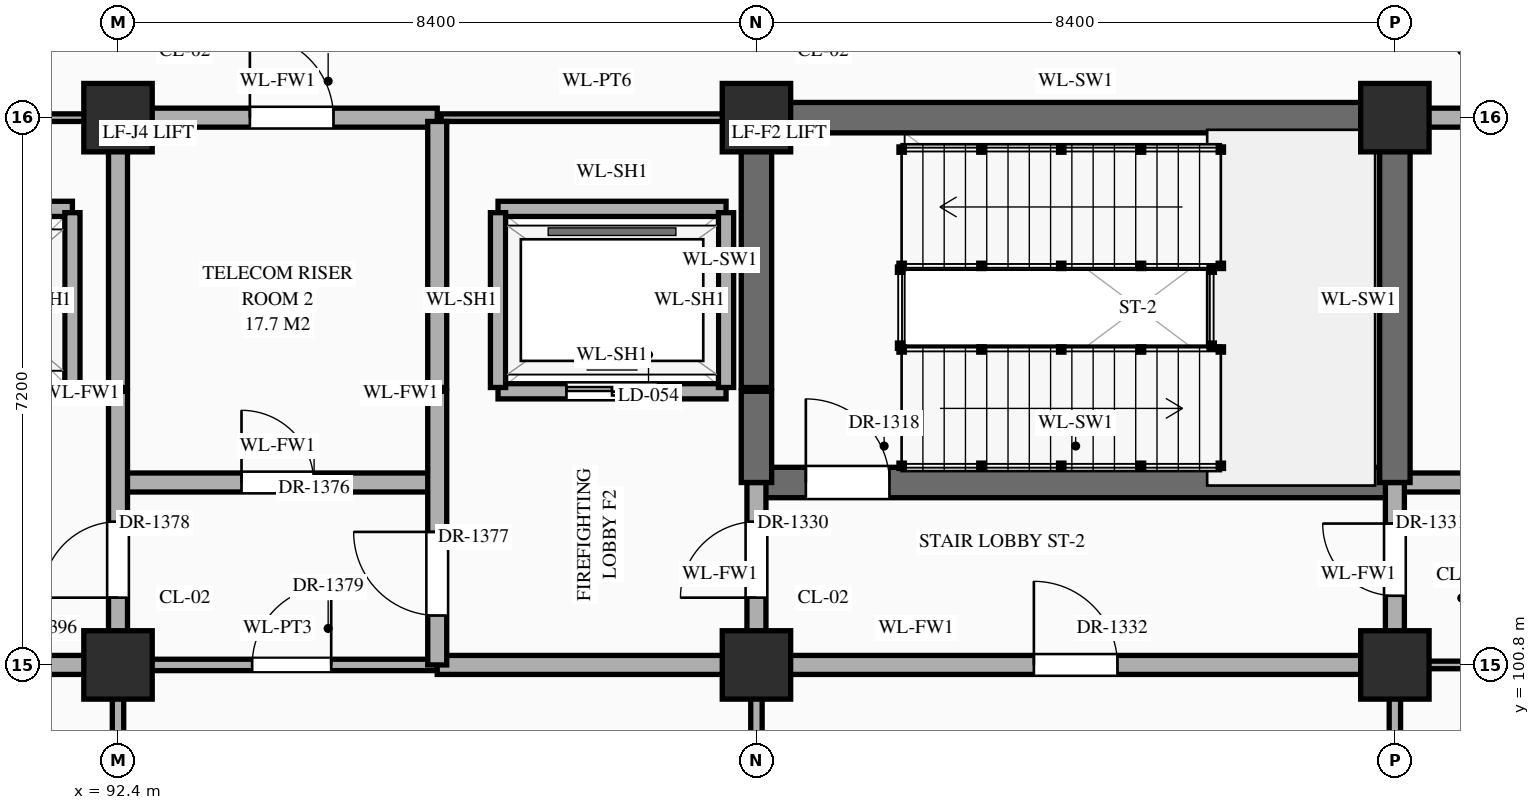
"""IFC4 building model, lengths in metres.
Left out: names, types, materials, properties, quantities, classifications, styles, units other than length and angle.
Written with IfcOpenShell. Run it as: python <this file> out.ifc"""

import sys

from ifc_helpers import new_model, si_unit, direction, frame, frame_2d, origin, origin_2d, place, context, subcontext, project, spatial, rectangle, extrude, element, fill, save


model = new_model("IFC4")
c1 = context("Model", 3, precision=1e-05, world=origin(), true_north=direction((0.0, 1.0)))
c2 = subcontext(c1, "Body", "Model", "MODEL_VIEW")
j1 = project(units=[si_unit("LENGTHUNIT", "METRE"), si_unit("PLANEANGLEUNIT", "RADIAN")], contexts=[c1])
p1 = place(None, origin())
s1 = spatial("IfcSite", under=j1, at=p1, CompositionType="ELEMENT")
p2 = place(p1, origin())
s2 = spatial("IfcBuilding", under=s1, at=p2, CompositionType="ELEMENT")
p3 = place(p2, frame((0.0, 0.0, 10.8)))
s3 = spatial("IfcBuildingStorey", under=s2, at=p3, CompositionType="ELEMENT", Elevation=10.8)
for number, where, z_axis, x_axis in (
    (1, (92.4, 100.8, 0.0), (0.0, 0.0, 1.0), (1.0, 0.0, 0.0)),
    (2, (92.4, 108.0, 0.0), (0.0, 0.0, 1.0), (1.0, 0.0, 0.0)),
    (3, (100.8, 100.8, 0.0), (0.0, 0.0, 1.0), (1.0, 0.0, 0.0)),
    (4, (100.8, 108.0, 0.0), (0.0, 0.0, 1.0), (1.0, 0.0, 0.0)),
    (5, (109.2, 100.8, 0.0), (0.0, 0.0, 1.0), (1.0, 0.0, 0.0)),
    (6, (109.2, 108.0, 0.0), (0.0, 0.0, 1.0), (1.0, 0.0, 0.0)),
):
    element("IfcColumn", number, at=place(p3, frame(where, z_axis=z_axis, x_axis=x_axis)), inside=s3, PredefinedType="COLUMN", context=c2, shape_type="SweptSolid", body=[
        extrude(rectangle(XDim=0.9, YDim=0.9, at=origin_2d()), origin(), (0.0, 0.0, 1.0), 5.4),
    ])
p4 = place(p3, frame((75.6, 100.8, 0.0), z_axis=(0.0, 0.0, 1.0), x_axis=(1.0, 0.0, 0.0)))
e7 = element("IfcWall", 7, at=p4, inside=s3, PredefinedType="STANDARD", context=c2, shape_type="SweptSolid", body=[
    extrude(rectangle(XDim=16.8, YDim=0.25, at=frame_2d((8.4, 0.0))), origin(), (0.0, 0.0, 1.0), 4.27),
])
p5 = place(p4, frame((3.65, 0.0, 0.0)))
e8 = element("IfcOpeningElement", 8, at=p5, cuts=e7, PredefinedType="OPENING", context=c2, shape_type="SweptSolid", body=[
    extrude(rectangle(XDim=1.1, YDim=2.2, at=frame_2d((0.55, 1.1))), frame((0.0, 0.137, 0.0), z_axis=(0.0, -1.0, 0.0), x_axis=(1.0, 0.0, 0.0)), (0.0, 0.0, 1.0), 0.274),
])
p6 = place(p4, frame((9.81, 0.0, 0.0)))
e9 = element("IfcOpeningElement", 9, at=p6, cuts=e7, PredefinedType="OPENING", context=c2, shape_type="SweptSolid", body=[
    extrude(rectangle(XDim=0.95, YDim=2.15, at=frame_2d((0.475, 1.075))), frame((0.0, 0.137, 0.0), z_axis=(0.0, -1.0, 0.0), x_axis=(1.0, 0.0, 0.0)), (0.0, 0.0, 1.0), 0.274),
])
p7 = place(p4, frame((12.45, 0.0, 0.0)))
e10 = element("IfcOpeningElement", 10, at=p7, cuts=e7, PredefinedType="OPENING", context=c2, shape_type="SweptSolid", body=[
    extrude(rectangle(XDim=1.1, YDim=2.2, at=frame_2d((0.55, 1.1))), frame((0.0, 0.137, 0.0), z_axis=(0.0, -1.0, 0.0), x_axis=(1.0, 0.0, 0.0)), (0.0, 0.0, 1.0), 0.274),
])
p8 = place(p4, frame((14.815, 0.0, 0.0)))
e11 = element("IfcOpeningElement", 11, at=p8, cuts=e7, PredefinedType="OPENING", context=c2, shape_type="SweptSolid", body=[
    extrude(rectangle(XDim=1.0, YDim=2.2, at=frame_2d((0.5, 1.1))), frame((0.0, 0.137, 0.0), z_axis=(0.0, -1.0, 0.0), x_axis=(1.0, 0.0, 0.0)), (0.0, 0.0, 1.0), 0.274),
])
p9 = place(p3, frame((92.4, 100.8, 0.0), z_axis=(0.0, 0.0, 1.0), x_axis=(1.0, 0.0, 0.0)))
e12 = element("IfcWall", 12, at=p9, inside=s3, PredefinedType="STANDARD", context=c2, shape_type="SweptSolid", body=[
    extrude(rectangle(XDim=4.2, YDim=0.15, at=frame_2d((2.1, 0.0))), origin(), (0.0, 0.0, 1.0), 4.27),
])
p10 = place(p9, frame((1.765, 0.0, 0.0)))
e13 = element("IfcOpeningElement", 13, at=p10, cuts=e12, PredefinedType="OPENING", context=c2, shape_type="SweptSolid", body=[
    extrude(rectangle(XDim=1.04, YDim=2.2, at=frame_2d((0.52, 1.1))), frame((0.0, 0.087, 0.0), z_axis=(0.0, -1.0, 0.0), x_axis=(1.0, 0.0, 0.0)), (0.0, 0.0, 1.0), 0.174),
])
p11 = place(p3, frame((96.6, 100.8, 0.0), z_axis=(0.0, 0.0, 1.0), x_axis=(1.0, 0.0, 0.0)))
e14 = element("IfcWall", 14, at=p11, inside=s3, PredefinedType="STANDARD", context=c2, shape_type="SweptSolid", body=[
    extrude(rectangle(XDim=12.6, YDim=0.25, at=frame_2d((6.3, 0.0))), origin(), (0.0, 0.0, 1.0), 4.27),
])
p12 = place(p11, frame((7.85, 0.0, 0.0)))
e15 = element("IfcOpeningElement", 15, at=p12, cuts=e14, PredefinedType="OPENING", context=c2, shape_type="SweptSolid", body=[
    extrude(rectangle(XDim=1.1, YDim=2.2, at=frame_2d((0.55, 1.1))), frame((0.0, 0.137, 0.0), z_axis=(0.0, -1.0, 0.0), x_axis=(1.0, 0.0, 0.0)), (0.0, 0.0, 1.0), 0.274),
])
p13 = place(p3, frame((109.2, 100.8, 0.0), z_axis=(0.0, 0.0, 1.0), x_axis=(1.0, 0.0, 0.0)))
e16 = element("IfcWall", 16, at=p13, inside=s3, PredefinedType="STANDARD", context=c2, shape_type="SweptSolid", body=[
    extrude(rectangle(XDim=3.4, YDim=0.1, at=frame_2d((1.7, 0.0))), origin(), (0.0, 0.0, 1.0), 4.27),
])
p14 = place(p13, frame((1.425, 0.0, 0.0)))
e17 = element("IfcOpeningElement", 17, at=p14, cuts=e16, PredefinedType="OPENING", context=c2, shape_type="SweptSolid", body=[
    extrude(rectangle(XDim=0.92, YDim=2.15, at=frame_2d((0.46, 1.075))), frame((0.0, 0.062, 0.0), z_axis=(0.0, -1.0, 0.0), x_axis=(1.0, 0.0, 0.0)), (0.0, 0.0, 1.0), 0.124),
])
p15 = place(p3, frame((92.4, 103.2, 0.0), z_axis=(0.0, 0.0, 1.0), x_axis=(1.0, 0.0, 0.0)))
e18 = element("IfcWall", 18, at=p15, inside=s3, PredefinedType="STANDARD", context=c2, shape_type="SweptSolid", body=[
    extrude(rectangle(XDim=4.2, YDim=0.25, at=frame_2d((2.1, 0.0))), origin(), (0.0, 0.0, 1.0), 5.12),
])
p16 = place(p15, frame((1.625, 0.0, 0.0)))
e19 = element("IfcOpeningElement", 19, at=p16, cuts=e18, PredefinedType="OPENING", context=c2, shape_type="SweptSolid", body=[
    extrude(rectangle(XDim=0.95, YDim=2.15, at=frame_2d((0.475, 1.075))), frame((0.0, 0.137, 0.0), z_axis=(0.0, -1.0, 0.0), x_axis=(1.0, 0.0, 0.0)), (0.0, 0.0, 1.0), 0.274),
])
p17 = place(p3, frame((100.8, 103.2, 0.0), z_axis=(0.0, 0.0, 1.0), x_axis=(1.0, 0.0, 0.0)))
e20 = element("IfcWall", 20, at=p17, inside=s3, PredefinedType="SHEAR", context=c2, shape_type="SweptSolid", body=[
    extrude(rectangle(XDim=8.4, YDim=0.4, at=frame_2d((4.2, 0.0))), origin(), (0.0, 0.0, 1.0), 5.12),
])
p18 = place(p17, frame((0.65, 0.0, 0.0)))
e21 = element("IfcOpeningElement", 21, at=p18, cuts=e20, PredefinedType="OPENING", context=c2, shape_type="SweptSolid", body=[
    extrude(rectangle(XDim=1.1, YDim=2.2, at=frame_2d((0.55, 1.1))), frame((0.0, 0.212, 0.0), z_axis=(0.0, -1.0, 0.0), x_axis=(1.0, 0.0, 0.0)), (0.0, 0.0, 1.0), 0.424),
])
p19 = place(p3, frame((109.2, 103.2, 0.0), z_axis=(0.0, 0.0, 1.0), x_axis=(1.0, 0.0, 0.0)))
e22 = element("IfcWall", 22, at=p19, inside=s3, PredefinedType="STANDARD", context=c2, shape_type="SweptSolid", body=[
    extrude(rectangle(XDim=4.2, YDim=0.25, at=frame_2d((2.1, 0.0))), origin(), (0.0, 0.0, 1.0), 5.12),
])
p20 = place(p19, frame((1.6, 0.0, 0.0)))
e23 = element("IfcOpeningElement", 23, at=p20, cuts=e22, PredefinedType="OPENING", context=c2, shape_type="SweptSolid", body=[
    extrude(rectangle(XDim=1.0, YDim=2.2, at=frame_2d((0.5, 1.1))), frame((0.0, 0.137, 0.0), z_axis=(0.0, -1.0, 0.0), x_axis=(1.0, 0.0, 0.0)), (0.0, 0.0, 1.0), 0.274),
])
p21 = place(p3, frame((89.4, 104.4, 0.0), z_axis=(0.0, 0.0, 1.0), x_axis=(1.0, 0.0, 0.0)))
e24 = element("IfcWall", 24, at=p21, inside=s3, PredefinedType="STANDARD", context=c2, shape_type="SweptSolid", body=[
    extrude(rectangle(XDim=2.4, YDim=0.2, at=frame_2d((1.2, 0.0))), origin(), (0.0, 0.0, 1.0), 5.12),
])
p22 = place(p21, frame((0.7, 0.0, 0.0)))
e25 = element("IfcOpeningElement", 25, at=p22, cuts=e24, PredefinedType="OPENING", context=c2, shape_type="SweptSolid", body=[
    extrude(rectangle(XDim=1.0, YDim=2.15, at=frame_2d((0.5, 1.075))), frame((0.0, 0.112, 0.0), z_axis=(0.0, -1.0, 0.0), x_axis=(1.0, 0.0, 0.0)), (0.0, 0.0, 1.0), 0.224),
])
p23 = place(p3, frame((97.4, 104.4, 0.0), z_axis=(0.0, 0.0, 1.0), x_axis=(1.0, 0.0, 0.0)))
e26 = element("IfcWall", 26, at=p23, inside=s3, PredefinedType="STANDARD", context=c2, shape_type="SweptSolid", body=[
    extrude(rectangle(XDim=3.0, YDim=0.2, at=frame_2d((1.5, 0.0))), origin(), (0.0, 0.0, 1.0), 5.12),
])
p24 = place(p23, frame((0.9, 0.0, 0.0)))
e27 = element("IfcOpeningElement", 27, at=p24, cuts=e26, PredefinedType="OPENING", context=c2, shape_type="SweptSolid", body=[
    extrude(rectangle(XDim=1.2, YDim=2.15, at=frame_2d((0.6, 1.075))), frame((0.0, 0.112, 0.0), z_axis=(0.0, -1.0, 0.0), x_axis=(1.0, 0.0, 0.0)), (0.0, 0.0, 1.0), 0.224),
])
p25 = place(p3, frame((89.4, 106.8, 0.0), z_axis=(0.0, 0.0, 1.0), x_axis=(1.0, 0.0, 0.0)))
e28 = element("IfcWall", 28, at=p25, inside=s3, PredefinedType="STANDARD", context=c2, shape_type="SweptSolid", body=[
    extrude(rectangle(XDim=2.4, YDim=0.2, at=frame_2d((1.2, 0.0))), origin(), (0.0, 0.0, 1.0), 5.12),
])
p26 = place(p3, frame((97.4, 106.8, 0.0), z_axis=(0.0, 0.0, 1.0), x_axis=(1.0, 0.0, 0.0)))
e29 = element("IfcWall", 29, at=p26, inside=s3, PredefinedType="STANDARD", context=c2, shape_type="SweptSolid", body=[
    extrude(rectangle(XDim=3.0, YDim=0.2, at=frame_2d((1.5, 0.0))), origin(), (0.0, 0.0, 1.0), 5.12),
])
p27 = place(p3, frame((86.2, 108.0, 0.0), z_axis=(0.0, 0.0, 1.0), x_axis=(1.0, 0.0, 0.0)))
e30 = element("IfcWall", 30, at=p27, inside=s3, PredefinedType="STANDARD", context=c2, shape_type="SweptSolid", body=[
    extrude(rectangle(XDim=6.15, YDim=0.1, at=frame_2d((3.075, 0.0))), origin(), (0.0, 0.0, 1.0), 4.27),
])
p28 = place(p3, frame((92.4, 108.0, 0.0), z_axis=(0.0, 0.0, 1.0), x_axis=(1.0, 0.0, 0.0)))
e31 = element("IfcWall", 31, at=p28, inside=s3, PredefinedType="STANDARD", context=c2, shape_type="SweptSolid", body=[
    extrude(rectangle(XDim=4.2, YDim=0.25, at=frame_2d((2.1, 0.0))), origin(), (0.0, 0.0, 1.0), 4.27),
])
p29 = place(p28, frame((1.735, 0.0, 0.0)))
e32 = element("IfcOpeningElement", 32, at=p29, cuts=e31, PredefinedType="OPENING", context=c2, shape_type="SweptSolid", body=[
    extrude(rectangle(XDim=1.1, YDim=2.2, at=frame_2d((0.55, 1.1))), frame((0.0, 0.137, 0.0), z_axis=(0.0, -1.0, 0.0), x_axis=(1.0, 0.0, 0.0)), (0.0, 0.0, 1.0), 0.274),
])
p30 = place(p3, frame((96.65, 108.0, 0.0), z_axis=(0.0, 0.0, 1.0), x_axis=(1.0, 0.0, 0.0)))
e33 = element("IfcWall", 33, at=p30, inside=s3, PredefinedType="STANDARD", context=c2, shape_type="SweptSolid", body=[
    extrude(rectangle(XDim=4.1, YDim=0.1, at=frame_2d((2.05, 0.0))), origin(), (0.0, 0.0, 1.0), 4.27),
])
p31 = place(p3, frame((100.8, 108.0, 0.0), z_axis=(0.0, 0.0, 1.0), x_axis=(1.0, 0.0, 0.0)))
e34 = element("IfcWall", 34, at=p31, inside=s3, PredefinedType="SHEAR", context=c2, shape_type="SweptSolid", body=[
    extrude(rectangle(XDim=8.4, YDim=0.4, at=frame_2d((4.2, 0.0))), origin(), (0.0, 0.0, 1.0), 5.12),
])
p32 = place(p3, frame((109.2, 108.0, 0.0), z_axis=(0.0, 0.0, 1.0), x_axis=(1.0, 0.0, 0.0)))
e35 = element("IfcWall", 35, at=p32, inside=s3, PredefinedType="STANDARD", context=c2, shape_type="SweptSolid", body=[
    extrude(rectangle(XDim=4.2, YDim=0.25, at=frame_2d((2.1, 0.0))), origin(), (0.0, 0.0, 1.0), 4.27),
])
p33 = place(p32, frame((1.785, 0.0, 0.0)))
e36 = element("IfcOpeningElement", 36, at=p33, cuts=e35, PredefinedType="OPENING", context=c2, shape_type="SweptSolid", body=[
    extrude(rectangle(XDim=1.0, YDim=2.2, at=frame_2d((0.5, 1.1))), frame((0.0, 0.137, 0.0), z_axis=(0.0, -1.0, 0.0), x_axis=(1.0, 0.0, 0.0)), (0.0, 0.0, 1.0), 0.274),
])
p34 = place(p3, frame((91.8, 104.45, 0.0), z_axis=(0.0, 0.0, 1.0), x_axis=(0.0, 1.0, 0.0)))
e37 = element("IfcWall", 37, at=p34, inside=s3, PredefinedType="STANDARD", context=c2, shape_type="SweptSolid", body=[
    extrude(rectangle(XDim=2.3, YDim=0.2, at=frame_2d((1.15, 0.0))), origin(), (0.0, 0.0, 1.0), 5.12),
])
p35 = place(p3, frame((92.4, 96.0, 0.0), z_axis=(0.0, 0.0, 1.0), x_axis=(0.0, 1.0, 0.0)))
e38 = element("IfcWall", 38, at=p35, inside=s3, PredefinedType="STANDARD", context=c2, shape_type="SweptSolid", body=[
    extrude(rectangle(XDim=4.8, YDim=0.15, at=frame_2d((2.4, 0.0))), origin(), (0.0, 0.0, 1.0), 4.37),
])
p36 = place(p3, frame((92.4, 100.8, 0.0), z_axis=(0.0, 0.0, 1.0), x_axis=(0.0, 1.0, 0.0)))
e39 = element("IfcWall", 39, at=p36, inside=s3, PredefinedType="STANDARD", context=c2, shape_type="SweptSolid", body=[
    extrude(rectangle(XDim=3.6, YDim=0.25, at=frame_2d((1.8, 0.0))), origin(), (0.0, 0.0, 1.0), 4.37),
])
p37 = place(p36, frame((0.885, 0.0, 0.0)))
e40 = element("IfcOpeningElement", 40, at=p37, cuts=e39, PredefinedType="OPENING", context=c2, shape_type="SweptSolid", body=[
    extrude(rectangle(XDim=1.0, YDim=2.2, at=frame_2d((0.5, 1.1))), frame((0.0, 0.137, 0.0), z_axis=(0.0, -1.0, 0.0), x_axis=(1.0, 0.0, 0.0)), (0.0, 0.0, 1.0), 0.274),
])
p38 = place(p3, frame((92.4, 104.45, 0.0), z_axis=(0.0, 0.0, 1.0), x_axis=(0.0, 1.0, 0.0)))
e41 = element("IfcWall", 41, at=p38, inside=s3, PredefinedType="STANDARD", context=c2, shape_type="SweptSolid", body=[
    extrude(rectangle(XDim=3.5, YDim=0.25, at=frame_2d((1.75, 0.0))), origin(), (0.0, 0.0, 1.0), 4.37),
])
p39 = place(p3, frame((96.6, 100.8, 0.0), z_axis=(0.0, 0.0, 1.0), x_axis=(0.0, 1.0, 0.0)))
e42 = element("IfcWall", 42, at=p39, inside=s3, PredefinedType="STANDARD", context=c2, shape_type="SweptSolid", body=[
    extrude(rectangle(XDim=3.6, YDim=0.25, at=frame_2d((1.8, 0.0))), origin(), (0.0, 0.0, 1.0), 4.72),
])
p40 = place(p39, frame((0.65, 0.0, 0.0)))
e43 = element("IfcOpeningElement", 43, at=p40, cuts=e42, PredefinedType="OPENING", context=c2, shape_type="SweptSolid", body=[
    extrude(rectangle(XDim=1.1, YDim=2.2, at=frame_2d((0.55, 1.1))), frame((0.0, 0.137, 0.0), z_axis=(0.0, -1.0, 0.0), x_axis=(1.0, 0.0, 0.0)), (0.0, 0.0, 1.0), 0.274),
])
p41 = place(p3, frame((96.6, 104.45, 0.0), z_axis=(0.0, 0.0, 1.0), x_axis=(0.0, 1.0, 0.0)))
e44 = element("IfcWall", 44, at=p41, inside=s3, PredefinedType="STANDARD", context=c2, shape_type="SweptSolid", body=[
    extrude(rectangle(XDim=3.5, YDim=0.25, at=frame_2d((1.75, 0.0))), origin(), (0.0, 0.0, 1.0), 4.72),
])
for number, where, z_axis, x_axis in (
    (45, (97.4, 104.45, 0.0), (0.0, 0.0, 1.0), (0.0, 1.0, 0.0)),
    (46, (100.4, 104.45, 0.0), (0.0, 0.0, 1.0), (0.0, 1.0, 0.0)),
):
    element("IfcWall", number, at=place(p3, frame(where, z_axis=z_axis, x_axis=x_axis)), inside=s3, PredefinedType="STANDARD", context=c2, shape_type="SweptSolid", body=[
        extrude(rectangle(XDim=2.3, YDim=0.2, at=frame_2d((1.15, 0.0))), origin(), (0.0, 0.0, 1.0), 5.12),
    ])
p42 = place(p3, frame((100.8, 96.0, 0.0), z_axis=(0.0, 0.0, 1.0), x_axis=(0.0, 1.0, 0.0)))
e47 = element("IfcWall", 47, at=p42, inside=s3, PredefinedType="STANDARD", context=c2, shape_type="SweptSolid", body=[
    extrude(rectangle(XDim=4.8, YDim=0.15, at=frame_2d((2.4, 0.0))), origin(), (0.0, 0.0, 1.0), 4.37),
])
p43 = place(p3, frame((100.8, 100.8, 0.0), z_axis=(0.0, 0.0, 1.0), x_axis=(0.0, 1.0, 0.0)))
e48 = element("IfcWall", 48, at=p43, inside=s3, PredefinedType="STANDARD", context=c2, shape_type="SweptSolid", body=[
    extrude(rectangle(XDim=2.4, YDim=0.25, at=frame_2d((1.2, 0.0))), origin(), (0.0, 0.0, 1.0), 4.37),
])
p44 = place(p43, frame((0.885, 0.0, 0.0)))
e49 = element("IfcOpeningElement", 49, at=p44, cuts=e48, PredefinedType="OPENING", context=c2, shape_type="SweptSolid", body=[
    extrude(rectangle(XDim=1.0, YDim=2.2, at=frame_2d((0.5, 1.1))), frame((0.0, 0.137, 0.0), z_axis=(0.0, -1.0, 0.0), x_axis=(1.0, 0.0, 0.0)), (0.0, 0.0, 1.0), 0.274),
])
p45 = place(p3, frame((100.8, 103.2, 0.0), z_axis=(0.0, 0.0, 1.0), x_axis=(0.0, 1.0, 0.0)))
e50 = element("IfcWall", 50, at=p45, inside=s3, PredefinedType="SHEAR", context=c2, shape_type="SweptSolid", body=[
    extrude(rectangle(XDim=1.2, YDim=0.4, at=frame_2d((0.6, 0.0))), origin(), (0.0, 0.0, 1.0), 5.12),
])
p46 = place(p3, frame((100.8, 104.45, 0.0), z_axis=(0.0, 0.0, 1.0), x_axis=(0.0, 1.0, 0.0)))
e51 = element("IfcWall", 51, at=p46, inside=s3, PredefinedType="SHEAR", context=c2, shape_type="SweptSolid", body=[
    extrude(rectangle(XDim=3.5, YDim=0.4, at=frame_2d((1.75, 0.0))), origin(), (0.0, 0.0, 1.0), 5.12),
])
p47 = place(p3, frame((109.2, 96.0, 0.0), z_axis=(0.0, 0.0, 1.0), x_axis=(0.0, 1.0, 0.0)))
e52 = element("IfcWall", 52, at=p47, inside=s3, PredefinedType="STANDARD", context=c2, shape_type="SweptSolid", body=[
    extrude(rectangle(XDim=4.8, YDim=0.15, at=frame_2d((2.4, 0.0))), origin(), (0.0, 0.0, 1.0), 4.37),
])
p48 = place(p3, frame((109.2, 100.8, 0.0), z_axis=(0.0, 0.0, 1.0), x_axis=(0.0, 1.0, 0.0)))
e53 = element("IfcWall", 53, at=p48, inside=s3, PredefinedType="STANDARD", context=c2, shape_type="SweptSolid", body=[
    extrude(rectangle(XDim=2.4, YDim=0.25, at=frame_2d((1.2, 0.0))), origin(), (0.0, 0.0, 1.0), 4.37),
])
p49 = place(p48, frame((0.91, 0.0, 0.0)))
e54 = element("IfcOpeningElement", 54, at=p49, cuts=e53, PredefinedType="OPENING", context=c2, shape_type="SweptSolid", body=[
    extrude(rectangle(XDim=0.95, YDim=2.15, at=frame_2d((0.475, 1.075))), frame((0.0, 0.137, 0.0), z_axis=(0.0, -1.0, 0.0), x_axis=(1.0, 0.0, 0.0)), (0.0, 0.0, 1.0), 0.274),
])
p50 = place(p3, frame((109.2, 103.2, 0.0), z_axis=(0.0, 0.0, 1.0), x_axis=(0.0, 1.0, 0.0)))
e55 = element("IfcWall", 55, at=p50, inside=s3, PredefinedType="SHEAR", context=c2, shape_type="SweptSolid", body=[
    extrude(rectangle(XDim=4.8, YDim=0.4, at=frame_2d((2.4, 0.0))), origin(), (0.0, 0.0, 1.0), 5.12),
])
p51 = place(p24, origin())
e56 = element("IfcDoor", 56, at=p51, inside=s3, OperationType="DOUBLE_DOOR_SLIDING", PredefinedType="DOOR", context=c2, shape_type="SweptSolid", body=[
    extrude(rectangle(XDim=1.2, YDim=2.15, at=frame_2d((0.6, 1.075))), frame((0.0, 0.025, 0.0), z_axis=(0.0, -1.0, 0.0), x_axis=(1.0, 0.0, 0.0)), (0.0, 0.0, 1.0), 0.05),
])
fill(e27, e56)
p52 = place(p18, origin())
e57 = element("IfcDoor", 57, at=p52, inside=s3, OperationType="SINGLE_SWING_LEFT", PredefinedType="DOOR", context=c2, shape_type="SweptSolid", body=[
    extrude(rectangle(XDim=1.1, YDim=2.2, at=frame_2d((0.55, 1.1))), frame((0.0, 0.025, 0.0), z_axis=(0.0, -1.0, 0.0), x_axis=(1.0, 0.0, 0.0)), (0.0, 0.0, 1.0), 0.05),
])
fill(e21, e57)
p53 = place(p44, origin())
e58 = element("IfcDoor", 58, at=p53, inside=s3, OperationType="SINGLE_SWING_LEFT", PredefinedType="DOOR", context=c2, shape_type="SweptSolid", body=[
    extrude(rectangle(XDim=1.0, YDim=2.2, at=frame_2d((0.5, 1.1))), frame((0.0, 0.025, 0.0), z_axis=(0.0, -1.0, 0.0), x_axis=(1.0, 0.0, 0.0)), (0.0, 0.0, 1.0), 0.05),
])
fill(e49, e58)
p54 = place(p49, origin())
e59 = element("IfcDoor", 59, at=p54, inside=s3, OperationType="SINGLE_SWING_RIGHT", PredefinedType="DOOR", context=c2, shape_type="SweptSolid", body=[
    extrude(rectangle(XDim=0.95, YDim=2.15, at=frame_2d((0.475, 1.075))), frame((0.0, 0.025, 0.0), z_axis=(0.0, -1.0, 0.0), x_axis=(1.0, 0.0, 0.0)), (0.0, 0.0, 1.0), 0.05),
])
fill(e54, e59)
p55 = place(p12, origin())
e60 = element("IfcDoor", 60, at=p55, inside=s3, OperationType="SINGLE_SWING_LEFT", PredefinedType="DOOR", context=c2, shape_type="SweptSolid", body=[
    extrude(rectangle(XDim=1.1, YDim=2.2, at=frame_2d((0.55, 1.1))), frame((0.0, 0.025, 0.0), z_axis=(0.0, -1.0, 0.0), x_axis=(1.0, 0.0, 0.0)), (0.0, 0.0, 1.0), 0.05),
])
fill(e15, e60)
p56 = place(p16, origin())
e61 = element("IfcDoor", 61, at=p56, inside=s3, OperationType="SINGLE_SWING_LEFT", PredefinedType="DOOR", context=c2, shape_type="SweptSolid", body=[
    extrude(rectangle(XDim=0.95, YDim=2.15, at=frame_2d((0.475, 1.075))), frame((0.0, 0.025, 0.0), z_axis=(0.0, -1.0, 0.0), x_axis=(1.0, 0.0, 0.0)), (0.0, 0.0, 1.0), 0.05),
])
fill(e19, e61)
p57 = place(p40, origin())
e62 = element("IfcDoor", 62, at=p57, inside=s3, OperationType="SINGLE_SWING_RIGHT", PredefinedType="DOOR", context=c2, shape_type="SweptSolid", body=[
    extrude(rectangle(XDim=1.1, YDim=2.2, at=frame_2d((0.55, 1.1))), frame((0.0, 0.025, 0.0), z_axis=(0.0, -1.0, 0.0), x_axis=(1.0, 0.0, 0.0)), (0.0, 0.0, 1.0), 0.05),
])
fill(e43, e62)
p58 = place(p37, origin())
e63 = element("IfcDoor", 63, at=p58, inside=s3, OperationType="SINGLE_SWING_LEFT", PredefinedType="DOOR", context=c2, shape_type="SweptSolid", body=[
    extrude(rectangle(XDim=1.0, YDim=2.2, at=frame_2d((0.5, 1.1))), frame((0.0, 0.025, 0.0), z_axis=(0.0, -1.0, 0.0), x_axis=(1.0, 0.0, 0.0)), (0.0, 0.0, 1.0), 0.05),
])
fill(e40, e63)
p59 = place(p10, origin())
e64 = element("IfcDoor", 64, at=p59, inside=s3, OperationType="SINGLE_SWING_RIGHT", PredefinedType="DOOR", context=c2, shape_type="SweptSolid", body=[
    extrude(rectangle(XDim=1.04, YDim=2.2, at=frame_2d((0.52, 1.1))), frame((0.0, 0.025, 0.0), z_axis=(0.0, -1.0, 0.0), x_axis=(1.0, 0.0, 0.0)), (0.0, 0.0, 1.0), 0.05),
])
fill(e13, e64)
p60 = place(p29, origin())
e65 = element("IfcDoor", 65, at=p60, inside=s3, OperationType="SINGLE_SWING_LEFT", PredefinedType="DOOR", context=c2, shape_type="SweptSolid", body=[
    extrude(rectangle(XDim=1.1, YDim=2.2, at=frame_2d((0.55, 1.1))), frame((0.0, 0.025, 0.0), z_axis=(0.0, -1.0, 0.0), x_axis=(1.0, 0.0, 0.0)), (0.0, 0.0, 1.0), 0.05),
])
fill(e32, e65)
save(model, sys.argv[1])
